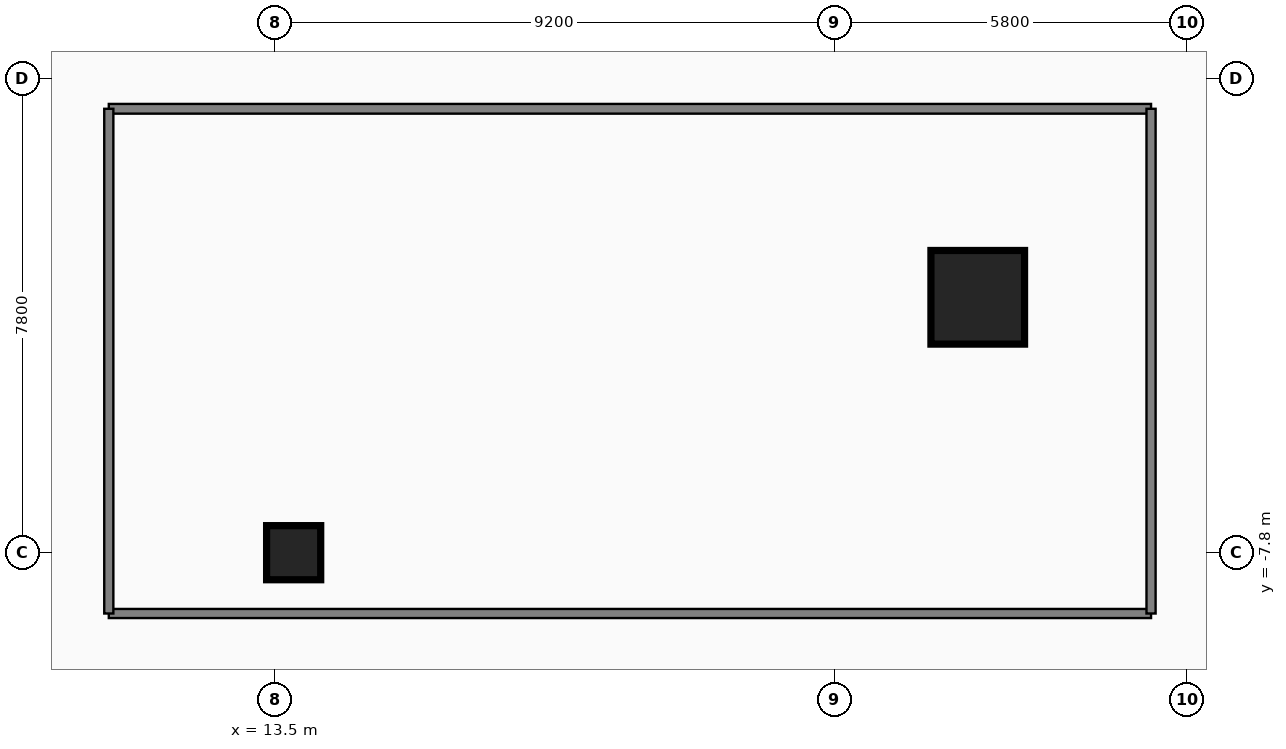
"""IFC4 building model, lengths in metres.
Left out: names, types, materials, properties, quantities, classifications, styles, units other than length and angle.
Written with IfcOpenShell. Run it as: python <this file> out.ifc"""

import sys

from ifc_helpers import new_model, si_unit, direction, frame, frame_2d, origin, origin_2d, place, context, subcontext, project, spatial, rectangle, extrude, element, fill, save


model = new_model("IFC4")
c1 = context("Model", 3, precision=1e-05, world=origin(), true_north=direction((0.0, 1.0)))
c2 = subcontext(c1, "Body", "Model", "MODEL_VIEW")
j1 = project(units=[si_unit("LENGTHUNIT", "METRE"), si_unit("PLANEANGLEUNIT", "RADIAN")], contexts=[c1])
p1 = place(None, origin())
s1 = spatial("IfcSite", under=j1, at=p1, CompositionType="ELEMENT")
p2 = place(p1, origin())
s2 = spatial("IfcBuilding", under=s1, at=p2, CompositionType="ELEMENT")
p3 = place(p2, origin())
s3 = spatial("IfcBuildingStorey", under=s2, at=p3, CompositionType="ELEMENT", Elevation=0.0)
p4 = place(p3, frame((25.05, -3.6, 0.0), z_axis=(0.0, 0.0, 1.0), x_axis=(1.0, 0.0, 0.0)))
e1 = element("IfcColumn", 1, at=p4, inside=s3, PredefinedType="COLUMN", context=c2, shape_type="SweptSolid", body=[
    extrude(rectangle(XDim=1.5, YDim=1.5, at=origin_2d()), origin(), (0.0, 0.0, 1.0), 6.0),
])
p5 = place(p3, frame((13.8, -7.8, 0.0), z_axis=(0.0, 0.0, 1.0), x_axis=(1.0, 0.0, 0.0)))
e2 = element("IfcColumn", 2, at=p5, inside=s3, PredefinedType="COLUMN", context=c2, shape_type="SweptSolid", body=[
    extrude(rectangle(XDim=0.85, YDim=0.85, at=origin_2d()), origin(), (0.0, 0.0, 1.0), 6.0),
])
p6 = place(p3, frame((10.76, -0.5, 0.0), z_axis=(0.0, 0.0, 1.0), x_axis=(1.0, 0.0, 0.0)))
e3 = element("IfcWall", 3, at=p6, inside=s3, PredefinedType="PARTITIONING", context=c2, shape_type="SweptSolid", body=[
    extrude(rectangle(XDim=17.14, YDim=0.16, at=frame_2d((8.57, 0.0))), origin(), (0.0, 0.0, 1.0), 5.75),
])
p7 = place(p6, frame((8.03, 0.0, 0.0)))
e4 = element("IfcOpeningElement", 4, at=p7, cuts=e3, PredefinedType="OPENING", context=c2, shape_type="SweptSolid", body=[
    extrude(rectangle(XDim=1.08, YDim=2.18, at=frame_2d((0.54, 1.09))), frame((0.0, 0.09, 0.0), z_axis=(0.0, -1.0, 0.0), x_axis=(1.0, 0.0, 0.0)), (0.0, 0.0, 1.0), 0.18),
])
p8 = place(p3, frame((10.76, -8.8, 0.0), z_axis=(0.0, 0.0, 1.0), x_axis=(1.0, 0.0, 0.0)))
e5 = element("IfcWall", 5, at=p8, inside=s3, PredefinedType="PARTITIONING", context=c2, shape_type="SweptSolid", body=[
    extrude(rectangle(XDim=17.14, YDim=0.15, at=frame_2d((8.57, 0.0))), origin(), (0.0, 0.0, 1.0), 5.75),
])
for number, where, z_axis, x_axis in (
    (6, (10.76, -8.8, 0.0), (0.0, 0.0, 1.0), (0.0, 1.0, 0.0)),
    (7, (27.9, -8.8, 0.0), (0.0, 0.0, 1.0), (0.0, 1.0, 0.0)),
):
    element("IfcWall", number, at=place(p3, frame(where, z_axis=z_axis, x_axis=x_axis)), inside=s3, PredefinedType="PARTITIONING", context=c2, shape_type="SweptSolid", body=[
        extrude(rectangle(XDim=8.3, YDim=0.15, at=frame_2d((4.15, 0.0))), origin(), (0.0, 0.0, 1.0), 5.75),
    ])
p9 = place(p7, origin())
e8 = element("IfcDoor", 8, at=p9, inside=s3, OperationType="SINGLE_SWING_RIGHT", PredefinedType="DOOR", context=c2, shape_type="SweptSolid", body=[
    extrude(rectangle(XDim=1.08, YDim=2.18, at=frame_2d((0.54, 1.09))), frame((0.0, 0.025, 0.0), z_axis=(0.0, -1.0, 0.0), x_axis=(1.0, 0.0, 0.0)), (0.0, 0.0, 1.0), 0.05),
])
fill(e4, e8)
save(model, sys.argv[1])
